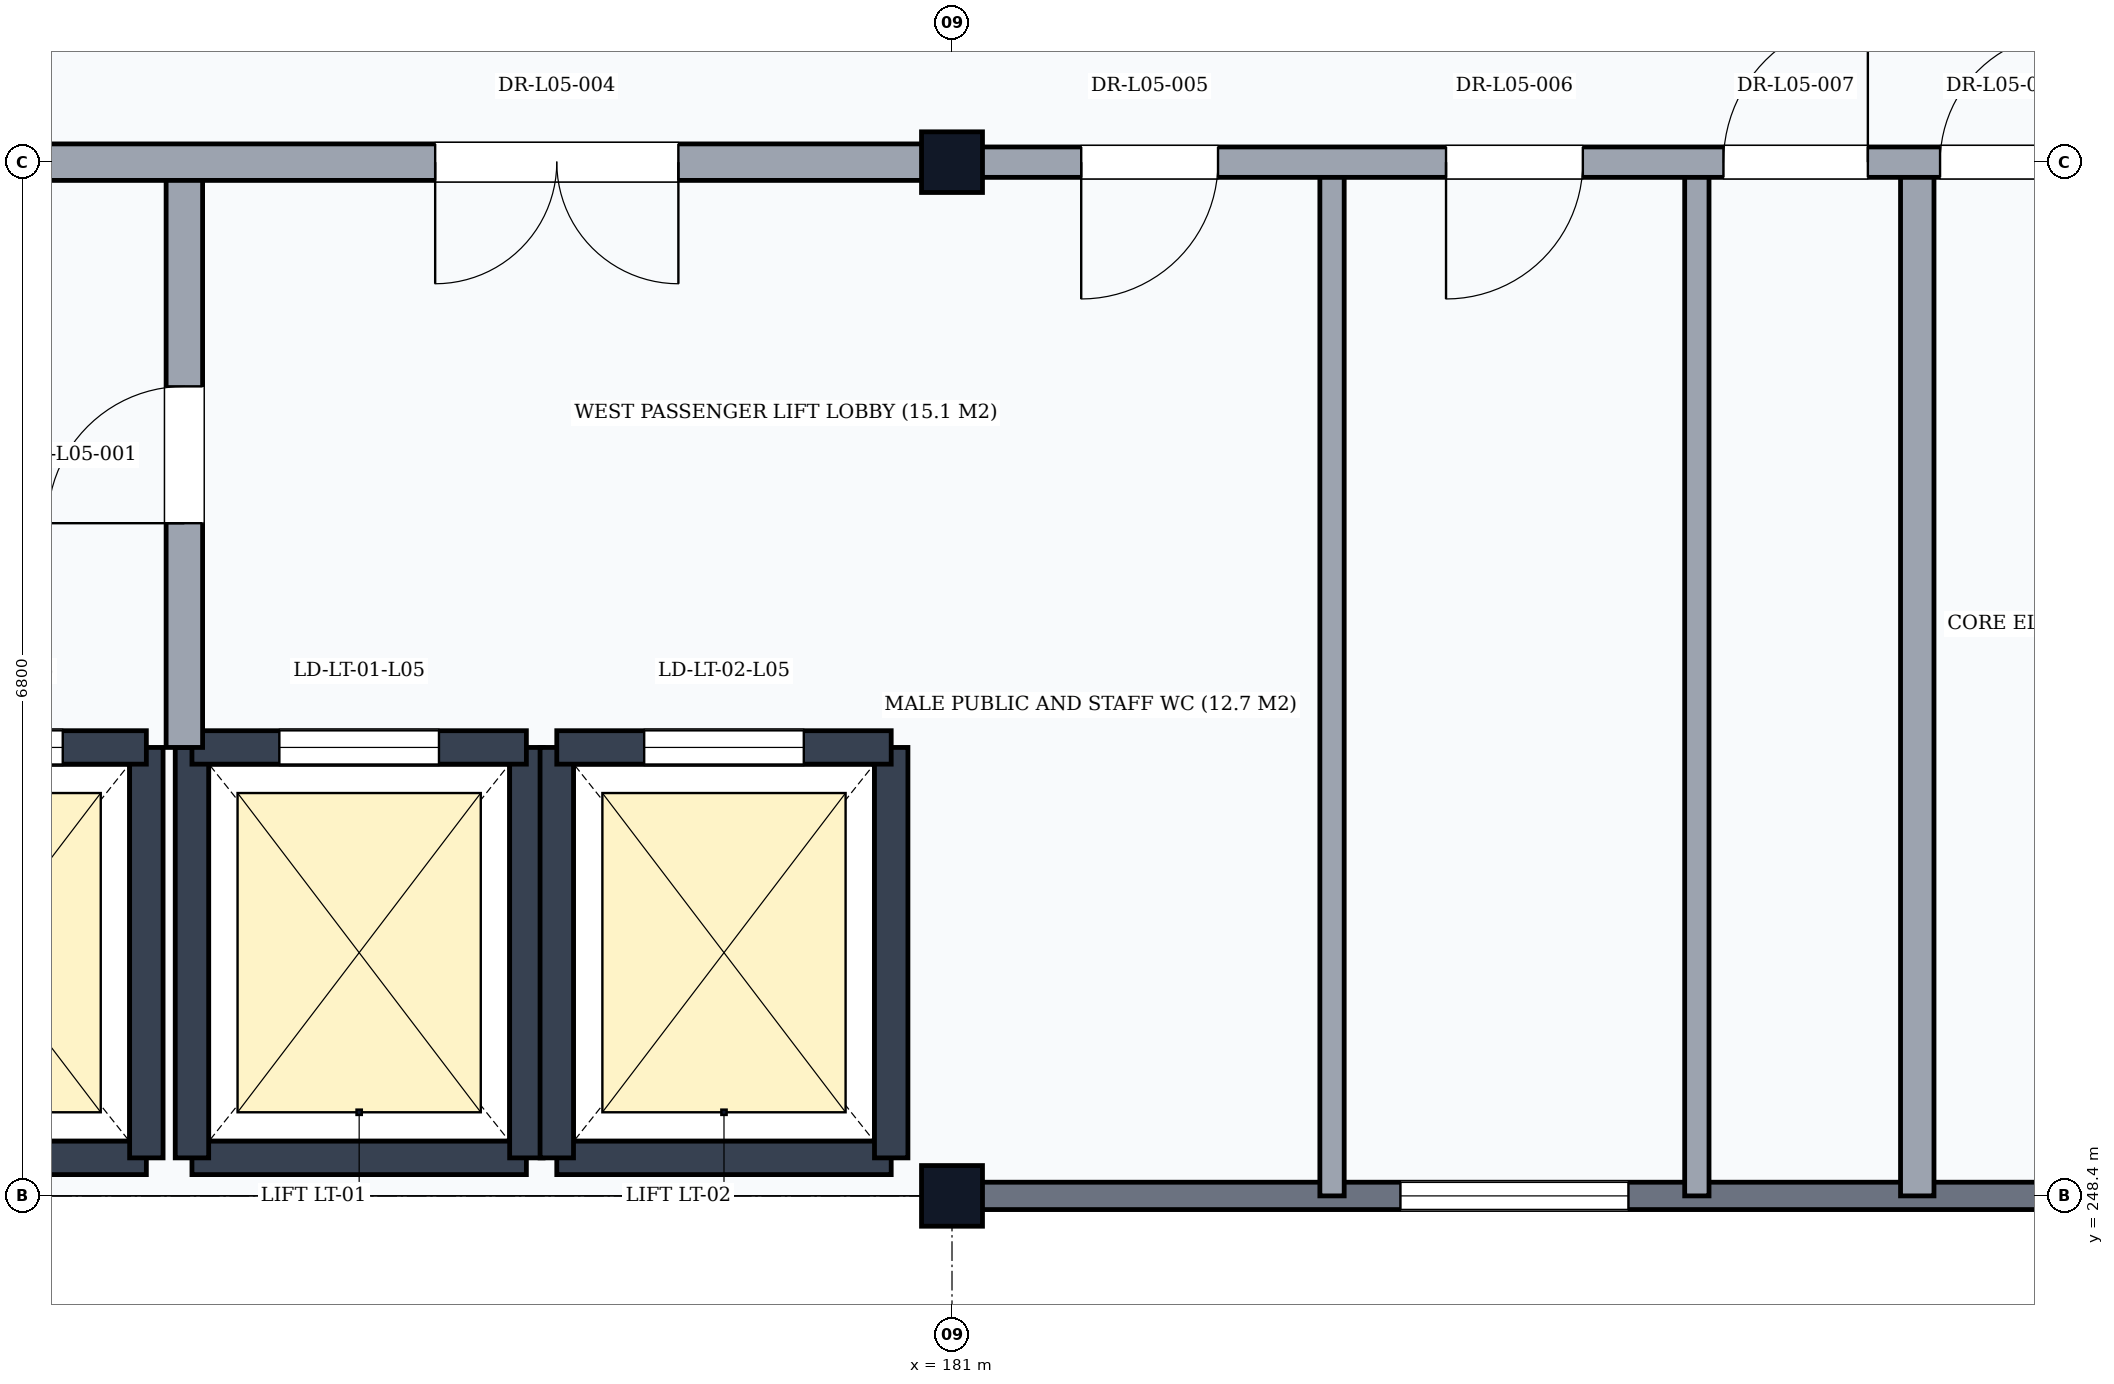
"""IFC4 building model, lengths in metres.
Left out: names, types, materials, properties, quantities, classifications, styles, units other than length and angle.
Written with IfcOpenShell. Run it as: python <this file> out.ifc"""

import sys

from ifc_helpers import new_model, si_unit, direction, frame, frame_2d, origin, origin_2d, place, context, subcontext, project, spatial, rectangle, i_section, extrude, element, fill, save


model = new_model("IFC4")
c1 = context("Model", 3, precision=1e-05, world=origin(), true_north=direction((0.0, 1.0)))
c2 = subcontext(c1, "Body", "Model", "MODEL_VIEW")
j1 = project(units=[si_unit("LENGTHUNIT", "METRE"), si_unit("PLANEANGLEUNIT", "RADIAN")], contexts=[c1])
p1 = place(None, origin())
s1 = spatial("IfcSite", under=j1, at=p1, CompositionType="ELEMENT")
p2 = place(p1, origin())
s2 = spatial("IfcBuilding", under=s1, at=p2, CompositionType="ELEMENT")
p3 = place(p2, frame((0.0, 0.0, 20.4)))
s3 = spatial("IfcBuildingStorey", under=s2, at=p3, CompositionType="ELEMENT", Elevation=20.4)
for number, where, z_axis, x_axis in (
    (1, (181.0, 248.4, 0.0), (0.0, 0.0, 1.0), (1.0, 0.0, 0.0)),
    (2, (181.0, 255.2, 0.0), (0.0, 0.0, 1.0), (1.0, 0.0, 0.0)),
):
    element("IfcColumn", number, at=place(p3, frame(where, z_axis=z_axis, x_axis=x_axis)), inside=s3, PredefinedType="COLUMN", context=c2, shape_type="SweptSolid", body=[
        extrude(i_section(OverallWidth=0.401, OverallDepth=0.399, WebThickness=0.025, FlangeThickness=0.04, FilletRadius=0.015, at=origin_2d()), origin(), (0.0, 0.0, 1.0), 3.9),
    ])
p4 = place(p3, frame((181.006, 248.4, 0.0), z_axis=(0.0, 0.0, 1.0), x_axis=(1.0, 0.0, 0.0)))
e3 = element("IfcWall", 3, at=p4, inside=s3, PredefinedType="SOLIDWALL", context=c2, shape_type="SweptSolid", body=[
    extrude(rectangle(XDim=7.988, YDim=0.18, at=frame_2d((3.994, 0.0))), origin(), (0.0, 0.0, 1.0), 3.348),
])
p5 = place(p4, frame((2.944, 0.0, 0.95)))
e4 = element("IfcOpeningElement", 4, at=p5, cuts=e3, PredefinedType="OPENING", context=c2, shape_type="SweptSolid", body=[
    extrude(rectangle(XDim=1.5, YDim=1.9, at=frame_2d((0.75, 0.95))), frame((0.0, 0.105, 0.0), z_axis=(0.0, -1.0, 0.0), x_axis=(1.0, 0.0, 0.0)), (0.0, 0.0, 1.0), 0.21),
])
p6 = place(p3, frame((173.5, 248.65, 0.0), z_axis=(0.0, 0.0, 1.0), x_axis=(1.0, 0.0, 0.0)))
e5 = element("IfcWall", 5, at=p6, inside=s3, PredefinedType="SHEAR", context=c2, shape_type="SweptSolid", body=[
    extrude(rectangle(XDim=2.2, YDim=0.22, at=frame_2d((1.1, 0.0))), origin(), (0.0, 0.0, 1.0), 3.66),
])
p7 = place(p3, frame((175.7, 248.65, 0.0), z_axis=(0.0, 0.0, 1.0), x_axis=(0.0, 1.0, 0.0)))
e6 = element("IfcWall", 6, at=p7, inside=s3, PredefinedType="SHEAR", context=c2, shape_type="SweptSolid", body=[
    extrude(rectangle(XDim=2.7, YDim=0.22, at=frame_2d((1.35, 0.0))), origin(), (0.0, 0.0, 1.0), 3.66),
])
p8 = place(p3, frame((173.5, 251.35, 0.0), z_axis=(0.0, 0.0, 1.0), x_axis=(1.0, 0.0, 0.0)))
e7 = element("IfcWall", 7, at=p8, inside=s3, PredefinedType="SHEAR", context=c2, shape_type="SweptSolid", body=[
    extrude(rectangle(XDim=2.2, YDim=0.22, at=frame_2d((1.1, 0.0))), origin(), (0.0, 0.0, 1.0), 3.66),
])
p9 = place(p8, frame((0.55, 0.0, 0.0)))
e8 = element("IfcOpeningElement", 8, at=p9, cuts=e7, PredefinedType="OPENING", context=c2, shape_type="SweptSolid", body=[
    extrude(rectangle(XDim=1.1, YDim=2.15, at=frame_2d((0.55, 1.075))), frame((0.0, 0.125, 0.0), z_axis=(0.0, -1.0, 0.0), x_axis=(1.0, 0.0, 0.0)), (0.0, 0.0, 1.0), 0.25),
])
p10 = place(p3, frame((176.0, 248.65, 0.0), z_axis=(0.0, 0.0, 1.0), x_axis=(1.0, 0.0, 0.0)))
e9 = element("IfcWall", 9, at=p10, inside=s3, PredefinedType="SHEAR", context=c2, shape_type="SweptSolid", body=[
    extrude(rectangle(XDim=2.2, YDim=0.22, at=frame_2d((1.1, 0.0))), origin(), (0.0, 0.0, 1.0), 3.66),
])
for number, where, z_axis, x_axis in (
    (10, (176.0, 248.65, 0.0), (0.0, 0.0, 1.0), (0.0, 1.0, 0.0)),
    (11, (178.2, 248.65, 0.0), (0.0, 0.0, 1.0), (0.0, 1.0, 0.0)),
):
    element("IfcWall", number, at=place(p3, frame(where, z_axis=z_axis, x_axis=x_axis)), inside=s3, PredefinedType="SHEAR", context=c2, shape_type="SweptSolid", body=[
        extrude(rectangle(XDim=2.7, YDim=0.22, at=frame_2d((1.35, 0.0))), origin(), (0.0, 0.0, 1.0), 3.66),
    ])
p11 = place(p3, frame((176.0, 251.35, 0.0), z_axis=(0.0, 0.0, 1.0), x_axis=(1.0, 0.0, 0.0)))
e12 = element("IfcWall", 12, at=p11, inside=s3, PredefinedType="SHEAR", context=c2, shape_type="SweptSolid", body=[
    extrude(rectangle(XDim=2.2, YDim=0.22, at=frame_2d((1.1, 0.0))), origin(), (0.0, 0.0, 1.0), 3.66),
])
p12 = place(p11, frame((0.575, 0.0, 0.0)))
e13 = element("IfcOpeningElement", 13, at=p12, cuts=e12, PredefinedType="OPENING", context=c2, shape_type="SweptSolid", body=[
    extrude(rectangle(XDim=1.05, YDim=2.15, at=frame_2d((0.525, 1.075))), frame((0.0, 0.125, 0.0), z_axis=(0.0, -1.0, 0.0), x_axis=(1.0, 0.0, 0.0)), (0.0, 0.0, 1.0), 0.25),
])
p13 = place(p3, frame((178.4, 248.65, 0.0), z_axis=(0.0, 0.0, 1.0), x_axis=(1.0, 0.0, 0.0)))
e14 = element("IfcWall", 14, at=p13, inside=s3, PredefinedType="SHEAR", context=c2, shape_type="SweptSolid", body=[
    extrude(rectangle(XDim=2.2, YDim=0.22, at=frame_2d((1.1, 0.0))), origin(), (0.0, 0.0, 1.0), 3.66),
])
for number, where, z_axis, x_axis in (
    (15, (178.4, 248.65, 0.0), (0.0, 0.0, 1.0), (0.0, 1.0, 0.0)),
    (16, (180.6, 248.65, 0.0), (0.0, 0.0, 1.0), (0.0, 1.0, 0.0)),
):
    element("IfcWall", number, at=place(p3, frame(where, z_axis=z_axis, x_axis=x_axis)), inside=s3, PredefinedType="SHEAR", context=c2, shape_type="SweptSolid", body=[
        extrude(rectangle(XDim=2.7, YDim=0.22, at=frame_2d((1.35, 0.0))), origin(), (0.0, 0.0, 1.0), 3.66),
    ])
p14 = place(p3, frame((178.4, 251.35, 0.0), z_axis=(0.0, 0.0, 1.0), x_axis=(1.0, 0.0, 0.0)))
e17 = element("IfcWall", 17, at=p14, inside=s3, PredefinedType="SHEAR", context=c2, shape_type="SweptSolid", body=[
    extrude(rectangle(XDim=2.2, YDim=0.22, at=frame_2d((1.1, 0.0))), origin(), (0.0, 0.0, 1.0), 3.66),
])
p15 = place(p14, frame((0.575, 0.0, 0.0)))
e18 = element("IfcOpeningElement", 18, at=p15, cuts=e17, PredefinedType="OPENING", context=c2, shape_type="SweptSolid", body=[
    extrude(rectangle(XDim=1.05, YDim=2.15, at=frame_2d((0.525, 1.075))), frame((0.0, 0.125, 0.0), z_axis=(0.0, -1.0, 0.0), x_axis=(1.0, 0.0, 0.0)), (0.0, 0.0, 1.0), 0.25),
])
p16 = place(p3, frame((175.95, 251.35, 0.0), z_axis=(0.0, 0.0, 1.0), x_axis=(0.0, 1.0, 0.0)))
e19 = element("IfcWall", 19, at=p16, inside=s3, PredefinedType="PARTITIONING", context=c2, shape_type="SweptSolid", body=[
    extrude(rectangle(XDim=3.85, YDim=0.24, at=frame_2d((1.925, 0.0))), origin(), (0.0, 0.0, 1.0), 3.66),
])
p17 = place(p16, frame((1.475, 0.0, 0.0)))
e20 = element("IfcOpeningElement", 20, at=p17, cuts=e19, PredefinedType="OPENING", context=c2, shape_type="SweptSolid", body=[
    extrude(rectangle(XDim=0.9, YDim=2.1, at=frame_2d((0.45, 1.05))), frame((0.0, 0.135, 0.0), z_axis=(0.0, -1.0, 0.0), x_axis=(1.0, 0.0, 0.0)), (0.0, 0.0, 1.0), 0.27),
])
for number, where, z_axis, x_axis in (
    (21, (183.5, 248.4, 0.0), (0.0, 0.0, 1.0), (0.0, 1.0, 0.0)),
    (22, (185.9, 248.4, 0.0), (0.0, 0.0, 1.0), (0.0, 1.0, 0.0)),
):
    element("IfcWall", number, at=place(p3, frame(where, z_axis=z_axis, x_axis=x_axis)), inside=s3, PredefinedType="PARTITIONING", context=c2, shape_type="SweptSolid", body=[
        extrude(rectangle(XDim=6.8, YDim=0.16, at=frame_2d((3.4, 0.0))), origin(), (0.0, 0.0, 1.0), 3.66),
    ])
p18 = place(p3, frame((187.35, 248.4, 0.0), z_axis=(0.0, 0.0, 1.0), x_axis=(0.0, 1.0, 0.0)))
e23 = element("IfcWall", 23, at=p18, inside=s3, PredefinedType="PARTITIONING", context=c2, shape_type="SweptSolid", body=[
    extrude(rectangle(XDim=6.8, YDim=0.22, at=frame_2d((3.4, 0.0))), origin(), (0.0, 0.0, 1.0), 3.66),
])
p19 = place(p3, frame((173.0, 255.2, 0.0), z_axis=(0.0, 0.0, 1.0), x_axis=(1.0, 0.0, 0.0)))
e24 = element("IfcWall", 24, at=p19, inside=s3, PredefinedType="PARTITIONING", context=c2, shape_type="SweptSolid", body=[
    extrude(rectangle(XDim=8.0, YDim=0.24, at=frame_2d((4.0, 0.0))), origin(), (0.0, 0.0, 1.0), 3.058),
])
p20 = place(p19, frame((1.05, 0.0, 0.0)))
e25 = element("IfcOpeningElement", 25, at=p20, cuts=e24, PredefinedType="OPENING", context=c2, shape_type="SweptSolid", body=[
    extrude(rectangle(XDim=1.0, YDim=2.1, at=frame_2d((0.5, 1.05))), frame((0.0, 0.135, 0.0), z_axis=(0.0, -1.0, 0.0), x_axis=(1.0, 0.0, 0.0)), (0.0, 0.0, 1.0), 0.27),
])
p21 = place(p19, frame((4.6, 0.0, 0.0)))
e26 = element("IfcOpeningElement", 26, at=p21, cuts=e24, PredefinedType="OPENING", context=c2, shape_type="SweptSolid", body=[
    extrude(rectangle(XDim=1.6, YDim=2.25, at=frame_2d((0.8, 1.125))), frame((0.0, 0.135, 0.0), z_axis=(0.0, -1.0, 0.0), x_axis=(1.0, 0.0, 0.0)), (0.0, 0.0, 1.0), 0.27),
])
p22 = place(p3, frame((181.0, 255.2, 0.0), z_axis=(0.0, 0.0, 1.0), x_axis=(1.0, 0.0, 0.0)))
e27 = element("IfcWall", 27, at=p22, inside=s3, PredefinedType="PARTITIONING", context=c2, shape_type="SweptSolid", body=[
    extrude(rectangle(XDim=8.0, YDim=0.2, at=frame_2d((4.0, 0.0))), origin(), (0.0, 0.0, 1.0), 3.058),
])
p23 = place(p22, frame((0.85, 0.0, 0.0)))
e28 = element("IfcOpeningElement", 28, at=p23, cuts=e27, PredefinedType="OPENING", context=c2, shape_type="SweptSolid", body=[
    extrude(rectangle(XDim=0.9, YDim=2.1, at=frame_2d((0.45, 1.05))), frame((0.0, 0.115, 0.0), z_axis=(0.0, -1.0, 0.0), x_axis=(1.0, 0.0, 0.0)), (0.0, 0.0, 1.0), 0.23),
])
p24 = place(p22, frame((3.25, 0.0, 0.0)))
e29 = element("IfcOpeningElement", 29, at=p24, cuts=e27, PredefinedType="OPENING", context=c2, shape_type="SweptSolid", body=[
    extrude(rectangle(XDim=0.9, YDim=2.1, at=frame_2d((0.45, 1.05))), frame((0.0, 0.115, 0.0), z_axis=(0.0, -1.0, 0.0), x_axis=(1.0, 0.0, 0.0)), (0.0, 0.0, 1.0), 0.23),
])
p25 = place(p22, frame((5.075, 0.0, 0.0)))
e30 = element("IfcOpeningElement", 30, at=p25, cuts=e27, PredefinedType="OPENING", context=c2, shape_type="SweptSolid", body=[
    extrude(rectangle(XDim=0.95, YDim=2.1, at=frame_2d((0.475, 1.05))), frame((0.0, 0.115, 0.0), z_axis=(0.0, -1.0, 0.0), x_axis=(1.0, 0.0, 0.0)), (0.0, 0.0, 1.0), 0.23),
])
p26 = place(p22, frame((6.5, 0.0, 0.0)))
e31 = element("IfcOpeningElement", 31, at=p26, cuts=e27, PredefinedType="OPENING", context=c2, shape_type="SweptSolid", body=[
    extrude(rectangle(XDim=0.85, YDim=2.1, at=frame_2d((0.425, 1.05))), frame((0.0, 0.115, 0.0), z_axis=(0.0, -1.0, 0.0), x_axis=(1.0, 0.0, 0.0)), (0.0, 0.0, 1.0), 0.23),
])
p27 = place(p5, origin())
e32 = element("IfcWindow", 32, at=p27, inside=s3, PartitioningType="SINGLE_PANEL", PredefinedType="WINDOW", context=c2, shape_type="SweptSolid", body=[
    extrude(rectangle(XDim=1.5, YDim=1.9, at=frame_2d((0.75, 0.95))), frame((0.0, 0.03, 0.0), z_axis=(0.0, -1.0, 0.0), x_axis=(1.0, 0.0, 0.0)), (0.0, 0.0, 1.0), 0.06),
])
fill(e4, e32)
p28 = place(p9, origin())
e33 = element("IfcDoor", 33, at=p28, inside=s3, OperationType="DOUBLE_DOOR_SLIDING", PredefinedType="USERDEFINED", context=c2, shape_type="SweptSolid", body=[
    extrude(rectangle(XDim=1.1, YDim=2.15, at=frame_2d((0.55, 1.075))), frame((0.0, 0.025, 0.0), z_axis=(0.0, -1.0, 0.0), x_axis=(1.0, 0.0, 0.0)), (0.0, 0.0, 1.0), 0.05),
])
fill(e8, e33)
p29 = place(p12, origin())
e34 = element("IfcDoor", 34, at=p29, inside=s3, OperationType="DOUBLE_DOOR_SLIDING", PredefinedType="USERDEFINED", context=c2, shape_type="SweptSolid", body=[
    extrude(rectangle(XDim=1.05, YDim=2.15, at=frame_2d((0.525, 1.075))), frame((0.0, 0.025, 0.0), z_axis=(0.0, -1.0, 0.0), x_axis=(1.0, 0.0, 0.0)), (0.0, 0.0, 1.0), 0.05),
])
fill(e13, e34)
p30 = place(p15, origin())
e35 = element("IfcDoor", 35, at=p30, inside=s3, OperationType="DOUBLE_DOOR_SLIDING", PredefinedType="USERDEFINED", context=c2, shape_type="SweptSolid", body=[
    extrude(rectangle(XDim=1.05, YDim=2.15, at=frame_2d((0.525, 1.075))), frame((0.0, 0.025, 0.0), z_axis=(0.0, -1.0, 0.0), x_axis=(1.0, 0.0, 0.0)), (0.0, 0.0, 1.0), 0.05),
])
fill(e18, e35)
p31 = place(p17, origin())
e36 = element("IfcDoor", 36, at=p31, inside=s3, OperationType="SINGLE_SWING_LEFT", PredefinedType="DOOR", context=c2, shape_type="SweptSolid", body=[
    extrude(rectangle(XDim=0.9, YDim=2.1, at=frame_2d((0.45, 1.05))), frame((0.0, 0.025, 0.0), z_axis=(0.0, -1.0, 0.0), x_axis=(1.0, 0.0, 0.0)), (0.0, 0.0, 1.0), 0.05),
])
fill(e20, e36)
p32 = place(p21, frame((1.6, 0.0, 0.0), z_axis=(0.0, 0.0, 1.0), x_axis=(-1.0, 0.0, 0.0)))
e37 = element("IfcDoor", 37, at=p32, inside=s3, OperationType="DOUBLE_DOOR_SINGLE_SWING", PredefinedType="DOOR", context=c2, shape_type="SweptSolid", body=[
    extrude(rectangle(XDim=1.6, YDim=2.25, at=frame_2d((0.8, 1.125))), frame((0.0, 0.025, 0.0), z_axis=(0.0, -1.0, 0.0), x_axis=(1.0, 0.0, 0.0)), (0.0, 0.0, 1.0), 0.05),
])
fill(e26, e37)
p33 = place(p23, frame((0.9, 0.0, 0.0), z_axis=(0.0, 0.0, 1.0), x_axis=(-1.0, 0.0, 0.0)))
e38 = element("IfcDoor", 38, at=p33, inside=s3, OperationType="SINGLE_SWING_RIGHT", PredefinedType="DOOR", context=c2, shape_type="SweptSolid", body=[
    extrude(rectangle(XDim=0.9, YDim=2.1, at=frame_2d((0.45, 1.05))), frame((0.0, 0.025, 0.0), z_axis=(0.0, -1.0, 0.0), x_axis=(1.0, 0.0, 0.0)), (0.0, 0.0, 1.0), 0.05),
])
fill(e28, e38)
p34 = place(p24, frame((0.9, 0.0, 0.0), z_axis=(0.0, 0.0, 1.0), x_axis=(-1.0, 0.0, 0.0)))
e39 = element("IfcDoor", 39, at=p34, inside=s3, OperationType="SINGLE_SWING_RIGHT", PredefinedType="DOOR", context=c2, shape_type="SweptSolid", body=[
    extrude(rectangle(XDim=0.9, YDim=2.1, at=frame_2d((0.45, 1.05))), frame((0.0, 0.025, 0.0), z_axis=(0.0, -1.0, 0.0), x_axis=(1.0, 0.0, 0.0)), (0.0, 0.0, 1.0), 0.05),
])
fill(e29, e39)
p35 = place(p25, frame((0.95, 0.0, 0.0), z_axis=(0.0, 0.0, 1.0), x_axis=(-1.0, 0.0, 0.0)))
e40 = element("IfcDoor", 40, at=p35, inside=s3, OperationType="SINGLE_SWING_LEFT", PredefinedType="DOOR", context=c2, shape_type="SweptSolid", body=[
    extrude(rectangle(XDim=0.95, YDim=2.1, at=frame_2d((0.475, 1.05))), frame((0.0, 0.025, 0.0), z_axis=(0.0, -1.0, 0.0), x_axis=(1.0, 0.0, 0.0)), (0.0, 0.0, 1.0), 0.05),
])
fill(e30, e40)
p36 = place(p26, frame((0.85, 0.0, 0.0), z_axis=(0.0, 0.0, 1.0), x_axis=(-1.0, 0.0, 0.0)))
e41 = element("IfcDoor", 41, at=p36, inside=s3, OperationType="SINGLE_SWING_LEFT", PredefinedType="DOOR", context=c2, shape_type="SweptSolid", body=[
    extrude(rectangle(XDim=0.85, YDim=2.1, at=frame_2d((0.425, 1.05))), frame((0.0, 0.025, 0.0), z_axis=(0.0, -1.0, 0.0), x_axis=(1.0, 0.0, 0.0)), (0.0, 0.0, 1.0), 0.05),
])
fill(e31, e41)
save(model, sys.argv[1])
